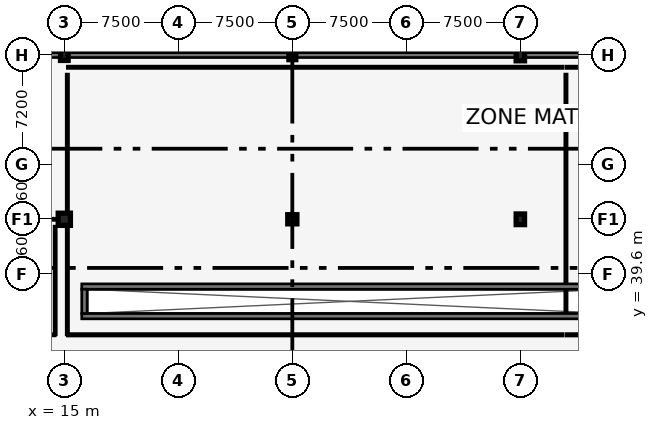
"""IFC4 building model, lengths in metres.
Left out: names, types, materials, properties, quantities, classifications, styles, units other than length and angle.
Written with IfcOpenShell. Run it as: python <this file> out.ifc"""

import sys

from ifc_helpers import new_model, si_unit, direction, frame, frame_2d, origin, origin_2d, place, context, subcontext, project, spatial, rectangle, circle, extrude, element, fill, save


model = new_model("IFC4")
c1 = context("Model", 3, precision=1e-05, world=origin(), true_north=direction((0.0, 1.0)))
c2 = subcontext(c1, "Body", "Model", "MODEL_VIEW")
j1 = project(units=[si_unit("LENGTHUNIT", "METRE"), si_unit("PLANEANGLEUNIT", "RADIAN")], contexts=[c1])
p1 = place(None, origin())
s1 = spatial("IfcSite", under=j1, at=p1, CompositionType="ELEMENT")
p2 = place(p1, origin())
s2 = spatial("IfcBuilding", under=s1, at=p2, CompositionType="ELEMENT")
p3 = place(p2, origin())
s3 = spatial("IfcBuildingStorey", under=s2, at=p3, CompositionType="ELEMENT", Elevation=0.0)
for number, where, z_axis, x_axis in (
    (1, (16.15, 36.825, -1.65), (0.0, 0.0, 1.0), (1.0, 0.0, 0.0)),
    (2, (16.15, 38.775, -1.65), (0.0, 0.0, 1.0), (1.0, 0.0, 0.0)),
):
    element("IfcWall", number, at=place(p3, frame(where, z_axis=z_axis, x_axis=x_axis)), inside=s3, PredefinedType="USERDEFINED", context=c2, shape_type="SweptSolid", body=[
        extrude(rectangle(XDim=35.2, YDim=0.35, at=frame_2d((17.6, 0.0))), origin(), (0.0, 0.0, 1.0), 1.225),
    ])
p4 = place(p3, frame((16.325, 37.0, -1.65), z_axis=(0.0, 0.0, 1.0), x_axis=(0.0, 1.0, 0.0)))
e3 = element("IfcWall", 3, at=p4, inside=s3, PredefinedType="USERDEFINED", context=c2, shape_type="SweptSolid", body=[
    extrude(rectangle(XDim=1.6, YDim=0.35, at=frame_2d((0.8, 0.0))), origin(), (0.0, 0.0, 1.0), 1.225),
])
p5 = place(p3, frame((15.0, 43.2, 0.0), z_axis=(0.0, 0.0, 1.0), x_axis=(1.0, 0.0, 0.0)))
e4 = element("IfcColumn", 4, at=p5, inside=s3, PredefinedType="COLUMN", context=c2, shape_type="SweptSolid", body=[
    extrude(rectangle(XDim=0.8, YDim=0.8, at=origin_2d()), origin(), (0.0, 0.0, 1.0), 4.8),
])
p6 = place(p3, frame((15.0, 54.0, 0.0), z_axis=(0.0, 0.0, 1.0), x_axis=(1.0, 0.0, 0.0)))
e5 = element("IfcColumn", 5, at=p6, inside=s3, PredefinedType="COLUMN", context=c2, shape_type="SweptSolid", body=[
    extrude(rectangle(XDim=0.5, YDim=0.7, at=origin_2d()), origin(), (0.0, 0.0, 1.0), 4.8),
])
p7 = place(p3, frame((30.0, 43.2, 0.0), z_axis=(0.0, 0.0, 1.0), x_axis=(1.0, 0.0, 0.0)))
e6 = element("IfcColumn", 6, at=p7, inside=s3, PredefinedType="COLUMN", context=c2, shape_type="SweptSolid", body=[
    extrude(circle(Radius=0.3, at=origin_2d()), origin(), (0.0, 0.0, 1.0), 4.8),
])
p8 = place(p3, frame((30.0, 54.0, 0.0), z_axis=(0.0, 0.0, 1.0), x_axis=(1.0, 0.0, 0.0)))
e7 = element("IfcColumn", 7, at=p8, inside=s3, PredefinedType="COLUMN", context=c2, shape_type="SweptSolid", body=[
    extrude(rectangle(XDim=0.45, YDim=0.6, at=origin_2d()), origin(), (0.0, 0.0, 1.0), 4.8),
])
p9 = place(p3, frame((45.0, 43.2, 0.0), z_axis=(0.0, 0.0, 1.0), x_axis=(1.0, 0.0, 0.0)))
e8 = element("IfcColumn", 8, at=p9, inside=s3, PredefinedType="COLUMN", context=c2, shape_type="SweptSolid", body=[
    extrude(rectangle(XDim=0.55, YDim=0.7, at=origin_2d()), origin(), (0.0, 0.0, 1.0), 4.8),
])
p10 = place(p3, frame((45.0, 54.0, 0.0), z_axis=(0.0, 0.0, 1.0), x_axis=(1.0, 0.0, 0.0)))
e9 = element("IfcColumn", 9, at=p10, inside=s3, PredefinedType="COLUMN", context=c2, shape_type="SweptSolid", body=[
    extrude(rectangle(XDim=0.55, YDim=0.75, at=origin_2d()), origin(), (0.0, 0.0, 1.0), 4.8),
])
p11 = place(p3, frame((93.6, 54.0, 0.0), z_axis=(0.0, 0.0, 1.0), x_axis=(-1.0, 0.0, 0.0)))
e10 = element("IfcWall", 10, at=p11, inside=s3, PredefinedType="SOLIDWALL", context=c2, shape_type="SweptSolid", body=[
    extrude(rectangle(XDim=93.6, YDim=0.32, at=frame_2d((46.8, 0.0))), origin(), (0.0, 0.0, 1.0), 3.92),
])
p12 = place(p11, frame((2.2, 0.0, 2.35)))
e11 = element("IfcOpeningElement", 11, at=p12, cuts=e10, PredefinedType="OPENING", context=c2, shape_type="SweptSolid", body=[
    extrude(rectangle(XDim=3.0, YDim=1.25, at=frame_2d((1.5, 0.625))), frame((0.0, 0.17, 0.0), z_axis=(0.0, -1.0, 0.0), x_axis=(1.0, 0.0, 0.0)), (0.0, 0.0, 1.0), 0.34),
])
p13 = place(p11, frame((9.4, 0.0, 2.35)))
e12 = element("IfcOpeningElement", 12, at=p13, cuts=e10, PredefinedType="OPENING", context=c2, shape_type="SweptSolid", body=[
    extrude(rectangle(XDim=2.4, YDim=1.2, at=frame_2d((1.2, 0.6))), frame((0.0, 0.17, 0.0), z_axis=(0.0, -1.0, 0.0), x_axis=(1.0, 0.0, 0.0)), (0.0, 0.0, 1.0), 0.34),
])
p14 = place(p11, frame((23.8, 0.0, 2.35)))
e13 = element("IfcOpeningElement", 13, at=p14, cuts=e10, PredefinedType="OPENING", context=c2, shape_type="SweptSolid", body=[
    extrude(rectangle(XDim=3.0, YDim=1.25, at=frame_2d((1.5, 0.625))), frame((0.0, 0.17, 0.0), z_axis=(0.0, -1.0, 0.0), x_axis=(1.0, 0.0, 0.0)), (0.0, 0.0, 1.0), 0.34),
])
p15 = place(p11, frame((38.2, 0.0, 2.35)))
e14 = element("IfcOpeningElement", 14, at=p15, cuts=e10, PredefinedType="OPENING", context=c2, shape_type="SweptSolid", body=[
    extrude(rectangle(XDim=2.7, YDim=1.2, at=frame_2d((1.35, 0.6))), frame((0.0, 0.17, 0.0), z_axis=(0.0, -1.0, 0.0), x_axis=(1.0, 0.0, 0.0)), (0.0, 0.0, 1.0), 0.34),
])
p16 = place(p11, frame((52.6, 0.0, 2.35)))
e15 = element("IfcOpeningElement", 15, at=p16, cuts=e10, PredefinedType="OPENING", context=c2, shape_type="SweptSolid", body=[
    extrude(rectangle(XDim=2.4, YDim=1.2, at=frame_2d((1.2, 0.6))), frame((0.0, 0.17, 0.0), z_axis=(0.0, -1.0, 0.0), x_axis=(1.0, 0.0, 0.0)), (0.0, 0.0, 1.0), 0.34),
])
p17 = place(p11, frame((59.8, 0.0, 2.35)))
e16 = element("IfcOpeningElement", 16, at=p17, cuts=e10, PredefinedType="OPENING", context=c2, shape_type="SweptSolid", body=[
    extrude(rectangle(XDim=2.7, YDim=1.2, at=frame_2d((1.35, 0.6))), frame((0.0, 0.17, 0.0), z_axis=(0.0, -1.0, 0.0), x_axis=(1.0, 0.0, 0.0)), (0.0, 0.0, 1.0), 0.34),
])
p18 = place(p11, frame((67.0, 0.0, 2.35)))
e17 = element("IfcOpeningElement", 17, at=p18, cuts=e10, PredefinedType="OPENING", context=c2, shape_type="SweptSolid", body=[
    extrude(rectangle(XDim=3.0, YDim=1.25, at=frame_2d((1.5, 0.625))), frame((0.0, 0.17, 0.0), z_axis=(0.0, -1.0, 0.0), x_axis=(1.0, 0.0, 0.0)), (0.0, 0.0, 1.0), 0.34),
])
p19 = place(p11, frame((74.2, 0.0, 2.35)))
e18 = element("IfcOpeningElement", 18, at=p19, cuts=e10, PredefinedType="OPENING", context=c2, shape_type="SweptSolid", body=[
    extrude(rectangle(XDim=2.4, YDim=1.2, at=frame_2d((1.2, 0.6))), frame((0.0, 0.17, 0.0), z_axis=(0.0, -1.0, 0.0), x_axis=(1.0, 0.0, 0.0)), (0.0, 0.0, 1.0), 0.34),
])
p20 = place(p11, frame((81.4, 0.0, 2.35)))
e19 = element("IfcOpeningElement", 19, at=p20, cuts=e10, PredefinedType="OPENING", context=c2, shape_type="SweptSolid", body=[
    extrude(rectangle(XDim=2.7, YDim=1.2, at=frame_2d((1.35, 0.6))), frame((0.0, 0.17, 0.0), z_axis=(0.0, -1.0, 0.0), x_axis=(1.0, 0.0, 0.0)), (0.0, 0.0, 1.0), 0.34),
])
p21 = place(p11, frame((6.2, 0.0, 0.0)))
e20 = element("IfcOpeningElement", 20, at=p21, cuts=e10, PredefinedType="OPENING", context=c2, shape_type="SweptSolid", body=[
    extrude(rectangle(XDim=2.0, YDim=2.35, at=frame_2d((1.0, 1.175))), frame((0.0, 0.17, 0.0), z_axis=(0.0, -1.0, 0.0), x_axis=(1.0, 0.0, 0.0)), (0.0, 0.0, 1.0), 0.34),
])
p22 = place(p11, frame((20.6, 0.0, 0.0)))
e21 = element("IfcOpeningElement", 21, at=p22, cuts=e10, PredefinedType="OPENING", context=c2, shape_type="SweptSolid", body=[
    extrude(rectangle(XDim=1.1, YDim=2.1, at=frame_2d((0.55, 1.05))), frame((0.0, 0.17, 0.0), z_axis=(0.0, -1.0, 0.0), x_axis=(1.0, 0.0, 0.0)), (0.0, 0.0, 1.0), 0.34),
])
p23 = place(p11, frame((35.0, 0.0, 0.0)))
e22 = element("IfcOpeningElement", 22, at=p23, cuts=e10, PredefinedType="OPENING", context=c2, shape_type="SweptSolid", body=[
    extrude(rectangle(XDim=2.0, YDim=2.35, at=frame_2d((1.0, 1.175))), frame((0.0, 0.17, 0.0), z_axis=(0.0, -1.0, 0.0), x_axis=(1.0, 0.0, 0.0)), (0.0, 0.0, 1.0), 0.34),
])
p24 = place(p11, frame((49.4, 0.0, 0.0)))
e23 = element("IfcOpeningElement", 23, at=p24, cuts=e10, PredefinedType="OPENING", context=c2, shape_type="SweptSolid", body=[
    extrude(rectangle(XDim=2.0, YDim=2.35, at=frame_2d((1.0, 1.175))), frame((0.0, 0.17, 0.0), z_axis=(0.0, -1.0, 0.0), x_axis=(1.0, 0.0, 0.0)), (0.0, 0.0, 1.0), 0.34),
])
p25 = place(p3, frame((48.0, 53.2, 0.0), z_axis=(0.0, 0.0, 1.0), x_axis=(1.0, 0.0, 0.0)))
e24 = element("IfcWall", 24, at=p25, inside=s3, PredefinedType="PARTITIONING", context=c2, shape_type="SweptSolid", body=[
    extrude(rectangle(XDim=36.0, YDim=0.15, at=frame_2d((18.0, 0.0))), origin(), (0.0, 0.0, 1.0), 4.1),
])
p26 = place(p3, frame((48.0, 52.75, 0.0), z_axis=(0.0, 0.0, 1.0), x_axis=(0.0, -1.0, 0.0)))
e25 = element("IfcWall", 25, at=p26, inside=s3, PredefinedType="PARTITIONING", context=c2, shape_type="SweptSolid", body=[
    extrude(rectangle(XDim=13.755, YDim=0.15, at=frame_2d((6.877, 0.0))), origin(), (0.0, 0.0, 1.0), 4.1),
])
p27 = place(p3, frame((48.0, 38.555, 0.0), z_axis=(0.0, 0.0, 1.0), x_axis=(0.0, -1.0, 0.0)))
e26 = element("IfcWall", 26, at=p27, inside=s3, PredefinedType="PARTITIONING", context=c2, shape_type="SweptSolid", body=[
    extrude(rectangle(XDim=1.51, YDim=0.15, at=frame_2d((0.755, 0.0))), origin(), (0.0, 0.0, 1.0), 4.1),
])
p28 = place(p3, frame((84.0, 35.6, 0.0), z_axis=(0.0, 0.0, 1.0), x_axis=(-1.0, 0.0, 0.0)))
e27 = element("IfcWall", 27, at=p28, inside=s3, PredefinedType="PARTITIONING", context=c2, shape_type="SweptSolid", body=[
    extrude(rectangle(XDim=36.0, YDim=0.16, at=frame_2d((18.0, 0.0))), origin(), (0.0, 0.0, 1.0), 4.025),
])
p29 = place(p28, frame((17.0, 0.0, 0.0)))
e28 = element("IfcOpeningElement", 28, at=p29, cuts=e27, PredefinedType="OPENING", context=c2, shape_type="SweptSolid", body=[
    extrude(rectangle(XDim=2.0, YDim=2.3, at=frame_2d((1.0, 1.15))), frame((0.0, 0.09, 0.0), z_axis=(0.0, -1.0, 0.0), x_axis=(1.0, 0.0, 0.0)), (0.0, 0.0, 1.0), 0.18),
])
p30 = place(p28, frame((30.8, 0.0, 0.0)))
e29 = element("IfcOpeningElement", 29, at=p30, cuts=e27, PredefinedType="OPENING", context=c2, shape_type="SweptSolid", body=[
    extrude(rectangle(XDim=2.0, YDim=2.3, at=frame_2d((1.0, 1.15))), frame((0.0, 0.09, 0.0), z_axis=(0.0, -1.0, 0.0), x_axis=(1.0, 0.0, 0.0)), (0.0, 0.0, 1.0), 0.18),
])
p31 = place(p3, frame((15.2, 53.2, 0.0), z_axis=(0.0, 0.0, 1.0), x_axis=(1.0, 0.0, 0.0)))
e30 = element("IfcWall", 30, at=p31, inside=s3, PredefinedType="PARTITIONING", context=c2, shape_type="SweptSolid", body=[
    extrude(rectangle(XDim=32.6, YDim=0.15, at=frame_2d((16.3, 0.0))), origin(), (0.0, 0.0, 1.0), 4.1),
])
p32 = place(p3, frame((15.2, 52.75, 0.0), z_axis=(0.0, 0.0, 1.0), x_axis=(0.0, -1.0, 0.0)))
e31 = element("IfcWall", 31, at=p32, inside=s3, PredefinedType="PARTITIONING", context=c2, shape_type="SweptSolid", body=[
    extrude(rectangle(XDim=17.15, YDim=0.15, at=frame_2d((8.575, 0.0))), origin(), (0.0, 0.0, 1.0), 4.025),
])
p33 = place(p3, frame((47.8, 35.6, 0.0), z_axis=(0.0, 0.0, 1.0), x_axis=(-1.0, 0.0, 0.0)))
e32 = element("IfcWall", 32, at=p33, inside=s3, PredefinedType="PARTITIONING", context=c2, shape_type="SweptSolid", body=[
    extrude(rectangle(XDim=32.6, YDim=0.16, at=frame_2d((16.3, 0.0))), origin(), (0.0, 0.0, 1.0), 4.025),
])
p34 = place(p33, frame((15.3, 0.0, 0.0)))
e33 = element("IfcOpeningElement", 33, at=p34, cuts=e32, PredefinedType="OPENING", context=c2, shape_type="SweptSolid", body=[
    extrude(rectangle(XDim=2.0, YDim=2.3, at=frame_2d((1.0, 1.15))), frame((0.0, 0.09, 0.0), z_axis=(0.0, -1.0, 0.0), x_axis=(1.0, 0.0, 0.0)), (0.0, 0.0, 1.0), 0.18),
])
p35 = place(p33, frame((27.4, 0.0, 0.0)))
e34 = element("IfcOpeningElement", 34, at=p35, cuts=e32, PredefinedType="OPENING", context=c2, shape_type="SweptSolid", body=[
    extrude(rectangle(XDim=2.0, YDim=2.3, at=frame_2d((1.0, 1.15))), frame((0.0, 0.09, 0.0), z_axis=(0.0, -1.0, 0.0), x_axis=(1.0, 0.0, 0.0)), (0.0, 0.0, 1.0), 0.18),
])
p36 = place(p3, frame((10.8, 43.2, 0.0), z_axis=(0.0, 0.0, 1.0), x_axis=(1.0, 0.0, 0.0)))
e35 = element("IfcWall", 35, at=p36, inside=s3, PredefinedType="PARTITIONING", context=c2, shape_type="SweptSolid", body=[
    extrude(rectangle(XDim=3.6, YDim=0.14, at=frame_2d((1.8, 0.0))), origin(), (0.0, 0.0, 1.0), 3.8),
])
p37 = place(p3, frame((14.4, 35.6, 0.0), z_axis=(0.0, 0.0, 1.0), x_axis=(0.0, 1.0, 0.0)))
e36 = element("IfcWall", 36, at=p37, inside=s3, PredefinedType="PARTITIONING", context=c2, shape_type="SweptSolid", body=[
    extrude(rectangle(XDim=7.15, YDim=0.14, at=frame_2d((3.575, 0.0))), origin(), (0.0, 0.0, 1.0), 3.8),
])
p38 = place(p3, frame((14.4, 35.6, 0.0), z_axis=(0.0, 0.0, 1.0), x_axis=(-1.0, 0.0, 0.0)))
e37 = element("IfcWall", 37, at=p38, inside=s3, PredefinedType="PARTITIONING", context=c2, shape_type="SweptSolid", body=[
    extrude(rectangle(XDim=3.6, YDim=0.14, at=frame_2d((1.8, 0.0))), origin(), (0.0, 0.0, 1.0), 3.8),
])
p39 = place(p38, frame((1.305, 0.0, 0.0)))
e38 = element("IfcOpeningElement", 38, at=p39, cuts=e37, PredefinedType="OPENING", context=c2, shape_type="SweptSolid", body=[
    extrude(rectangle(XDim=0.99, YDim=2.15, at=frame_2d((0.495, 1.075))), frame((0.0, 0.08, 0.0), z_axis=(0.0, -1.0, 0.0), x_axis=(1.0, 0.0, 0.0)), (0.0, 0.0, 1.0), 0.16),
])
p40 = place(p16, origin())
e39 = element("IfcWindow", 39, at=p40, inside=s3, PartitioningType="SINGLE_PANEL", PredefinedType="WINDOW", context=c2, shape_type="SweptSolid", body=[
    extrude(rectangle(XDim=2.4, YDim=1.2, at=frame_2d((1.2, 0.6))), frame((0.0, 0.03, 0.0), z_axis=(0.0, -1.0, 0.0), x_axis=(1.0, 0.0, 0.0)), (0.0, 0.0, 1.0), 0.06),
])
fill(e15, e39)
p41 = place(p17, origin())
e40 = element("IfcWindow", 40, at=p41, inside=s3, PartitioningType="SINGLE_PANEL", PredefinedType="WINDOW", context=c2, shape_type="SweptSolid", body=[
    extrude(rectangle(XDim=2.7, YDim=1.2, at=frame_2d((1.35, 0.6))), frame((0.0, 0.03, 0.0), z_axis=(0.0, -1.0, 0.0), x_axis=(1.0, 0.0, 0.0)), (0.0, 0.0, 1.0), 0.06),
])
fill(e16, e40)
p42 = place(p18, origin())
e41 = element("IfcWindow", 41, at=p42, inside=s3, PartitioningType="SINGLE_PANEL", PredefinedType="WINDOW", context=c2, shape_type="SweptSolid", body=[
    extrude(rectangle(XDim=3.0, YDim=1.25, at=frame_2d((1.5, 0.625))), frame((0.0, 0.03, 0.0), z_axis=(0.0, -1.0, 0.0), x_axis=(1.0, 0.0, 0.0)), (0.0, 0.0, 1.0), 0.06),
])
fill(e17, e41)
p43 = place(p19, origin())
e42 = element("IfcWindow", 42, at=p43, inside=s3, PartitioningType="SINGLE_PANEL", PredefinedType="WINDOW", context=c2, shape_type="SweptSolid", body=[
    extrude(rectangle(XDim=2.4, YDim=1.2, at=frame_2d((1.2, 0.6))), frame((0.0, 0.03, 0.0), z_axis=(0.0, -1.0, 0.0), x_axis=(1.0, 0.0, 0.0)), (0.0, 0.0, 1.0), 0.06),
])
fill(e18, e42)
p44 = place(p24, frame((2.0, 0.0, 0.0), z_axis=(0.0, 0.0, 1.0), x_axis=(-1.0, 0.0, 0.0)))
e43 = element("IfcDoor", 43, at=p44, inside=s3, OperationType="DOUBLE_SWING_LEFT", PredefinedType="DOOR", context=c2, shape_type="SweptSolid", body=[
    extrude(rectangle(XDim=2.0, YDim=2.35, at=frame_2d((1.0, 1.175))), frame((0.0, 0.025, 0.0), z_axis=(0.0, -1.0, 0.0), x_axis=(1.0, 0.0, 0.0)), (0.0, 0.0, 1.0), 0.05),
])
fill(e23, e43)
p45 = place(p34, origin())
e44 = element("IfcDoor", 44, at=p45, inside=s3, OperationType="DOUBLE_SWING_LEFT", PredefinedType="DOOR", context=c2, shape_type="SweptSolid", body=[
    extrude(rectangle(XDim=2.0, YDim=2.3, at=frame_2d((1.0, 1.15))), frame((0.0, 0.025, 0.0), z_axis=(0.0, -1.0, 0.0), x_axis=(1.0, 0.0, 0.0)), (0.0, 0.0, 1.0), 0.05),
])
fill(e33, e44)
p46 = place(p35, origin())
e45 = element("IfcDoor", 45, at=p46, inside=s3, OperationType="DOUBLE_SWING_LEFT", PredefinedType="DOOR", context=c2, shape_type="SweptSolid", body=[
    extrude(rectangle(XDim=2.0, YDim=2.3, at=frame_2d((1.0, 1.15))), frame((0.0, 0.025, 0.0), z_axis=(0.0, -1.0, 0.0), x_axis=(1.0, 0.0, 0.0)), (0.0, 0.0, 1.0), 0.05),
])
fill(e34, e45)
save(model, sys.argv[1])
